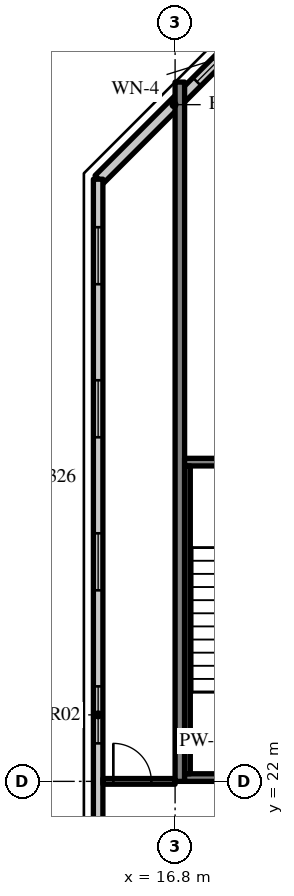
"""IFC4 building model, lengths in metres.
Left out: names, types, materials, properties, quantities, classifications, styles, units other than length and angle.
Written with IfcOpenShell. Run it as: python <this file> out.ifc"""

import sys

from ifc_helpers import new_model, si_unit, direction, frame, frame_2d, origin, place, context, subcontext, project, spatial, rectangle, extrude, source, transform, mapped, element, fill, save


model = new_model("IFC4")
c1 = context("Model", 3, precision=1e-05, world=origin(), true_north=direction((0.0, 1.0)))
c2 = subcontext(c1, "Body", "Model", "MODEL_VIEW")
j1 = project(units=[si_unit("LENGTHUNIT", "METRE"), si_unit("PLANEANGLEUNIT", "RADIAN")], contexts=[c1])
p1 = place(None, origin())
s1 = spatial("IfcSite", under=j1, at=p1, CompositionType="ELEMENT")
p2 = place(p1, origin())
s2 = spatial("IfcBuilding", under=s1, at=p2, CompositionType="ELEMENT")
p3 = place(p2, frame((0.0, 0.0, 305.7)))
s3 = spatial("IfcBuildingStorey", under=s2, at=p3, CompositionType="ELEMENT", Elevation=305.7)
m1 = source(origin(), c2, "Body", "SweptSolid", [
    extrude(rectangle(XDim=18.4, YDim=0.25, at=frame_2d((9.2, 0.0))), origin(), (0.0, 0.0, 1.0), 3.72),
])
p4 = place(p3, frame((16.925, 22.0, 0.0), z_axis=(0.0, 0.0, 1.0), x_axis=(0.0, 1.0, 0.0)))
e1 = element("IfcWall", 1, at=p4, inside=s3, PredefinedType="SHEAR", context=c2, shape_type="MappedRepresentation", body=[
    mapped(m1, transform((0.0, 0.0, 0.0), scale=1.0)),
])
m2 = source(origin(), c2, "Body", "SweptSolid", [
    extrude(rectangle(XDim=5.576, YDim=0.3, at=frame_2d((2.788, 0.0))), origin(), (0.0, 0.0, 1.0), 3.72),
])
p5 = place(p3, frame((18.743, 41.777, 0.0), z_axis=(0.0, 0.0, 1.0), x_axis=(-0.707106781187, -0.707106781187, 0.0)))
e2 = element("IfcWall", 2, at=p5, inside=s3, PredefinedType="SOLIDWALL", context=c2, shape_type="MappedRepresentation", body=[
    mapped(m2, transform((0.0, 0.0, 0.0), scale=1.0)),
])
m3 = source(origin(), c2, "Body", "SweptSolid", [
    extrude(rectangle(XDim=1.8, YDim=1.5, at=frame_2d((0.9, 0.75))), frame((0.0, 0.16, 0.0), z_axis=(0.0, -1.0, 0.0), x_axis=(1.0, 0.0, 0.0)), (0.0, 0.0, 1.0), 0.32),
])
p6 = place(p5, frame((0.135, 0.0, 0.9)))
e3 = element("IfcOpeningElement", 3, at=p6, cuts=e2, PredefinedType="OPENING", context=c2, shape_type="MappedRepresentation", body=[
    mapped(m3, transform((0.0, 0.0, 0.0), scale=1.0)),
])
m4 = source(origin(), c2, "Body", "SweptSolid", [
    extrude(rectangle(XDim=28.189, YDim=0.25, at=frame_2d((14.095, 0.0))), origin(), (0.0, 0.0, 1.0), 3.72),
])
p7 = place(p3, frame((14.775, 37.845, 0.0), z_axis=(0.0, 0.0, 1.0), x_axis=(0.0, -1.0, 0.0)))
e4 = element("IfcWall", 4, at=p7, inside=s3, PredefinedType="SOLIDWALL", context=c2, shape_type="MappedRepresentation", body=[
    mapped(m4, transform((0.0, 0.0, 0.0), scale=1.0)),
])
m5 = source(origin(), c2, "Body", "SweptSolid", [
    extrude(rectangle(XDim=1.5, YDim=1.5, at=frame_2d((0.75, 0.75))), frame((0.0, 0.135, 0.0), z_axis=(0.0, -1.0, 0.0), x_axis=(1.0, 0.0, 0.0)), (0.0, 0.0, 1.0), 0.27),
])
p8 = place(p7, frame((1.263, 0.0, 0.9)))
e5 = element("IfcOpeningElement", 5, at=p8, cuts=e4, PredefinedType="OPENING", context=c2, shape_type="MappedRepresentation", body=[
    mapped(m5, transform((0.0, 0.0, 0.0), scale=1.0)),
])
p9 = place(p7, frame((5.291, 0.0, 0.9)))
e6 = element("IfcOpeningElement", 6, at=p9, cuts=e4, PredefinedType="OPENING", context=c2, shape_type="MappedRepresentation", body=[
    mapped(m5, transform((0.0, 0.0, 0.0), scale=1.0)),
])
p10 = place(p7, frame((9.318, 0.0, 0.9)))
e7 = element("IfcOpeningElement", 7, at=p10, cuts=e4, PredefinedType="OPENING", context=c2, shape_type="MappedRepresentation", body=[
    mapped(m5, transform((0.0, 0.0, 0.0), scale=1.0)),
])
p11 = place(p7, frame((13.345, 0.0, 0.9)))
e8 = element("IfcOpeningElement", 8, at=p11, cuts=e4, PredefinedType="OPENING", context=c2, shape_type="MappedRepresentation", body=[
    mapped(m5, transform((0.0, 0.0, 0.0), scale=1.0)),
])
p12 = place(p7, frame((17.372, 0.0, 0.9)))
e9 = element("IfcOpeningElement", 9, at=p12, cuts=e4, PredefinedType="OPENING", context=c2, shape_type="MappedRepresentation", body=[
    mapped(m5, transform((0.0, 0.0, 0.0), scale=1.0)),
])
p13 = place(p7, frame((21.399, 0.0, 0.9)))
e10 = element("IfcOpeningElement", 10, at=p13, cuts=e4, PredefinedType="OPENING", context=c2, shape_type="MappedRepresentation", body=[
    mapped(m5, transform((0.0, 0.0, 0.0), scale=1.0)),
])
p14 = place(p7, frame((25.426, 0.0, 0.9)))
e11 = element("IfcOpeningElement", 11, at=p14, cuts=e4, PredefinedType="OPENING", context=c2, shape_type="MappedRepresentation", body=[
    mapped(m5, transform((0.0, 0.0, 0.0), scale=1.0)),
])
m6 = source(origin(), c2, "Body", "SweptSolid", [
    extrude(rectangle(XDim=8.15, YDim=0.2, at=frame_2d((4.075, 0.0))), origin(), (0.0, 0.0, 1.0), 3.72),
])
p15 = place(p3, frame((17.05, 22.1, 0.0), z_axis=(0.0, 0.0, 1.0), x_axis=(1.0, 0.0, 0.0)))
e12 = element("IfcWall", 12, at=p15, inside=s3, PredefinedType="SOLIDWALL", context=c2, shape_type="MappedRepresentation", body=[
    mapped(m6, transform((0.0, 0.0, 0.0), scale=1.0)),
])
m7 = source(origin(), c2, "Body", "SweptSolid", [
    extrude(rectangle(XDim=1.2, YDim=2.1, at=frame_2d((0.6, 1.05))), frame((0.0, 0.11, 0.0), z_axis=(0.0, -1.0, 0.0), x_axis=(1.0, 0.0, 0.0)), (0.0, 0.0, 1.0), 0.22),
])
p16 = place(p15, frame((5.95, 0.0, 0.0)))
e13 = element("IfcOpeningElement", 13, at=p16, cuts=e12, PredefinedType="OPENING", context=c2, shape_type="MappedRepresentation", body=[
    mapped(m7, transform((0.0, 0.0, 0.0), scale=1.0)),
])
p17 = place(p3, frame((17.05, 30.4, 0.0), z_axis=(0.0, 0.0, 1.0), x_axis=(1.0, 0.0, 0.0)))
e14 = element("IfcWall", 14, at=p17, inside=s3, PredefinedType="SOLIDWALL", context=c2, shape_type="MappedRepresentation", body=[
    mapped(m6, transform((0.0, 0.0, 0.0), scale=1.0)),
])
m8 = source(origin(), c2, "Body", "SweptSolid", [
    extrude(rectangle(XDim=1.0, YDim=2.1, at=frame_2d((0.5, 1.05))), frame((0.0, 0.11, 0.0), z_axis=(0.0, -1.0, 0.0), x_axis=(1.0, 0.0, 0.0)), (0.0, 0.0, 1.0), 0.22),
])
p18 = place(p17, frame((6.05, 0.0, 0.0)))
e15 = element("IfcOpeningElement", 15, at=p18, cuts=e14, PredefinedType="OPENING", context=c2, shape_type="MappedRepresentation", body=[
    mapped(m8, transform((0.0, 0.0, 0.0), scale=1.0)),
])
m9 = source(origin(), c2, "Body", "SweptSolid", [
    extrude(rectangle(XDim=8.1, YDim=0.15, at=frame_2d((4.05, 0.0))), origin(), (0.0, 0.0, 1.0), 3.72),
])
p19 = place(p3, frame((17.125, 22.2, 0.0), z_axis=(0.0, 0.0, 1.0), x_axis=(0.0, 1.0, 0.0)))
e16 = element("IfcWall", 16, at=p19, inside=s3, PredefinedType="SOLIDWALL", context=c2, shape_type="MappedRepresentation", body=[
    mapped(m9, transform((0.0, 0.0, 0.0), scale=1.0)),
])
m10 = source(origin(), c2, "Body", "SweptSolid", [
    extrude(rectangle(XDim=1.9, YDim=0.15, at=frame_2d((0.95, 0.0))), origin(), (0.0, 0.0, 1.0), 3.02),
])
p20 = place(p3, frame((14.9, 22.0, 0.0), z_axis=(0.0, 0.0, 1.0), x_axis=(1.0, 0.0, 0.0)))
e17 = element("IfcWall", 17, at=p20, inside=s3, PredefinedType="PARTITIONING", context=c2, shape_type="MappedRepresentation", body=[
    mapped(m10, transform((0.0, 0.0, 0.0), scale=1.0)),
])
m11 = source(origin(), c2, "Body", "SweptSolid", [
    extrude(rectangle(XDim=1.0, YDim=2.1, at=frame_2d((0.5, 1.05))), frame((0.0, 0.085, 0.0), z_axis=(0.0, -1.0, 0.0), x_axis=(1.0, 0.0, 0.0)), (0.0, 0.0, 1.0), 0.17),
])
p21 = place(p20, frame((0.275, 0.0, 0.0)))
e18 = element("IfcOpeningElement", 18, at=p21, cuts=e17, PredefinedType="OPENING", context=c2, shape_type="MappedRepresentation", body=[
    mapped(m11, transform((0.0, 0.0, 0.0), scale=1.0)),
])
m12 = source(origin(), c2, "Body", "SweptSolid", [
    extrude(rectangle(XDim=1.8, YDim=1.5, at=frame_2d((0.9, 0.75))), frame((0.0, 0.03, 0.0), z_axis=(0.0, -1.0, 0.0), x_axis=(1.0, 0.0, 0.0)), (0.0, 0.0, 1.0), 0.06),
])
p22 = place(p6, origin())
e19 = element("IfcWindow", 19, at=p22, inside=s3, PartitioningType="SINGLE_PANEL", PredefinedType="WINDOW", context=c2, shape_type="MappedRepresentation", body=[
    mapped(m12, transform((0.0, 0.0, 0.0), scale=1.0)),
])
fill(e3, e19)
m13 = source(origin(), c2, "Body", "SweptSolid", [
    extrude(rectangle(XDim=1.5, YDim=1.5, at=frame_2d((0.75, 0.75))), frame((0.0, 0.03, 0.0), z_axis=(0.0, -1.0, 0.0), x_axis=(1.0, 0.0, 0.0)), (0.0, 0.0, 1.0), 0.06),
])
p23 = place(p8, origin())
e20 = element("IfcWindow", 20, at=p23, inside=s3, PartitioningType="SINGLE_PANEL", PredefinedType="WINDOW", context=c2, shape_type="MappedRepresentation", body=[
    mapped(m13, transform((0.0, 0.0, 0.0), scale=1.0)),
])
fill(e5, e20)
p24 = place(p9, origin())
e21 = element("IfcWindow", 21, at=p24, inside=s3, PartitioningType="SINGLE_PANEL", PredefinedType="WINDOW", context=c2, shape_type="MappedRepresentation", body=[
    mapped(m13, transform((0.0, 0.0, 0.0), scale=1.0)),
])
fill(e6, e21)
p25 = place(p10, origin())
e22 = element("IfcWindow", 22, at=p25, inside=s3, PartitioningType="SINGLE_PANEL", PredefinedType="WINDOW", context=c2, shape_type="MappedRepresentation", body=[
    mapped(m13, transform((0.0, 0.0, 0.0), scale=1.0)),
])
fill(e7, e22)
p26 = place(p11, origin())
e23 = element("IfcWindow", 23, at=p26, inside=s3, PartitioningType="SINGLE_PANEL", PredefinedType="WINDOW", context=c2, shape_type="MappedRepresentation", body=[
    mapped(m13, transform((0.0, 0.0, 0.0), scale=1.0)),
])
fill(e8, e23)
m14 = source(origin(), c2, "Body", "SweptSolid", [
    extrude(rectangle(XDim=1.0, YDim=2.1, at=frame_2d((0.5, 1.05))), frame((0.0, 0.025, 0.0), z_axis=(0.0, -1.0, 0.0), x_axis=(1.0, 0.0, 0.0)), (0.0, 0.0, 1.0), 0.05),
])
p27 = place(p21, origin())
e24 = element("IfcDoor", 24, at=p27, inside=s3, OperationType="SINGLE_SWING_LEFT", PredefinedType="DOOR", context=c2, shape_type="MappedRepresentation", body=[
    mapped(m14, transform((0.0, 0.0, 0.0), scale=1.0)),
])
fill(e18, e24)
save(model, sys.argv[1])
